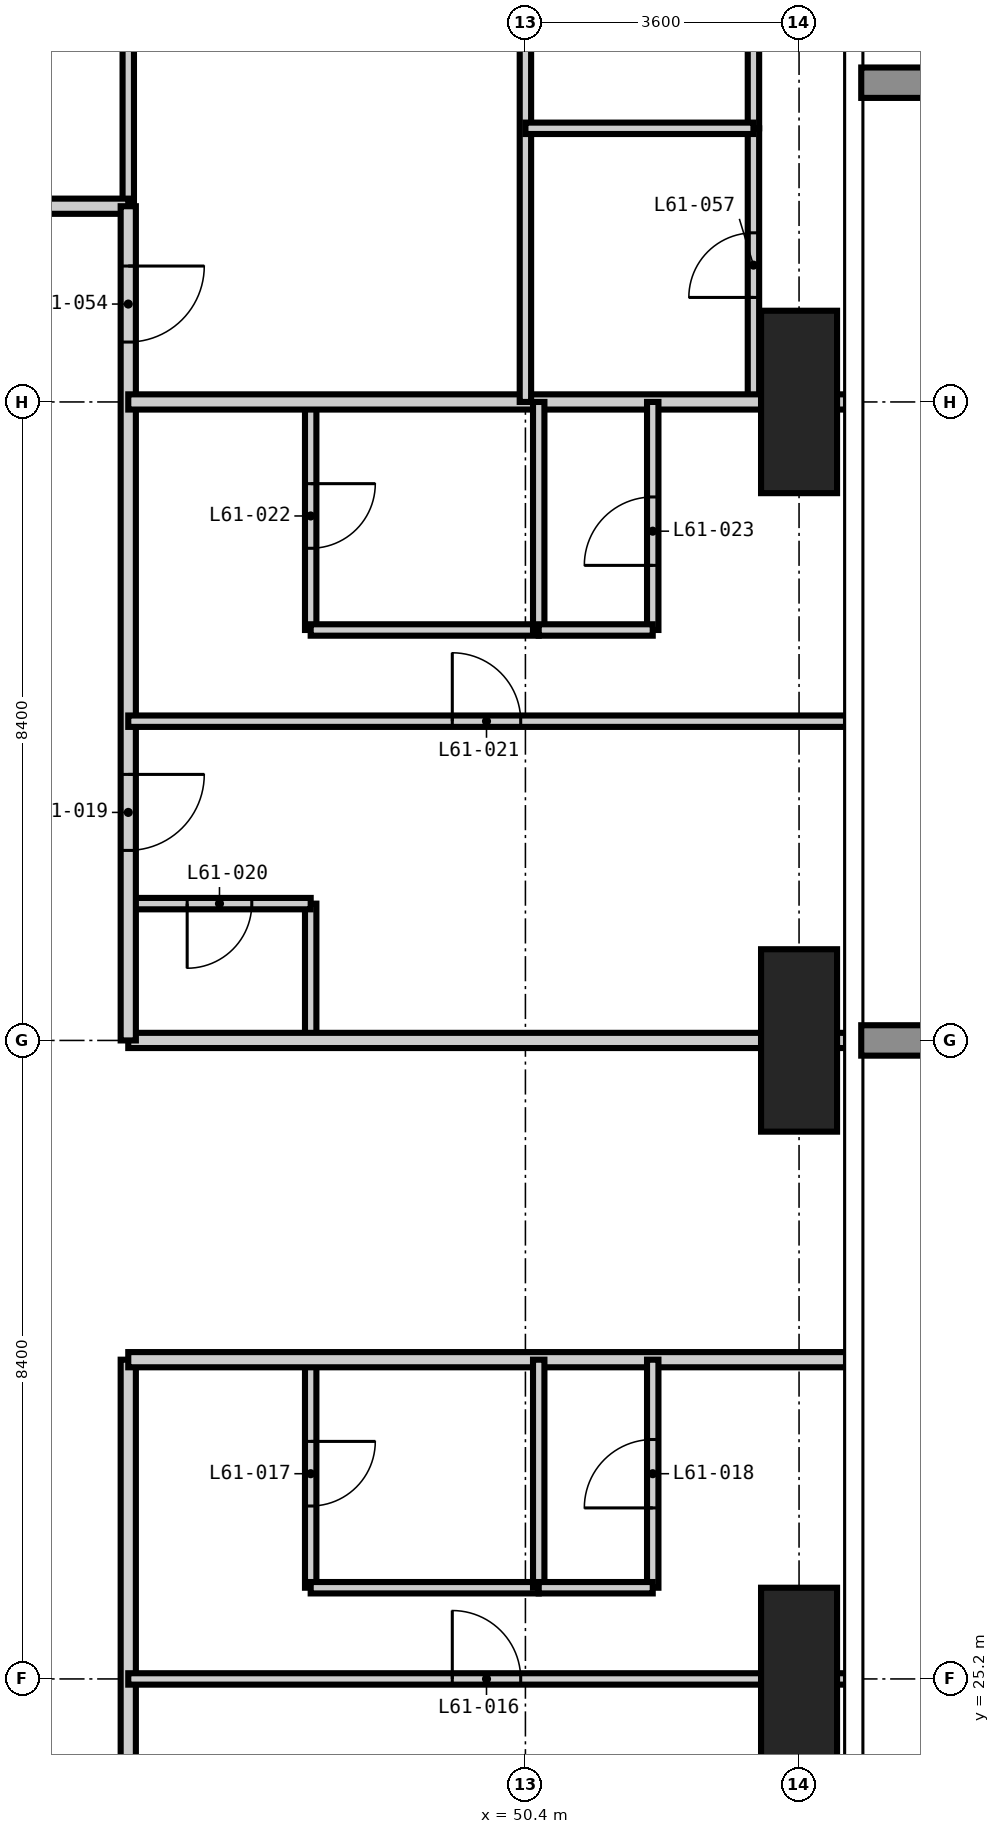
"""IFC4 building model, lengths in metres.
Left out: names, types, materials, properties, quantities, classifications, styles, units other than length and angle.
Written with IfcOpenShell. Run it as: python <this file> out.ifc"""

import sys

from ifc_helpers import new_model, si_unit, direction, frame, frame_2d, origin, origin_2d, place, context, subcontext, project, spatial, rectangle, extrude, element, fill, save


model = new_model("IFC4")
c1 = context("Model", 3, precision=1e-05, world=origin(), true_north=direction((0.0, 1.0)))
c2 = subcontext(c1, "Body", "Model", "MODEL_VIEW")
j1 = project(units=[si_unit("LENGTHUNIT", "METRE"), si_unit("PLANEANGLEUNIT", "RADIAN")], contexts=[c1])
p1 = place(None, origin())
s1 = spatial("IfcSite", under=j1, at=p1, CompositionType="ELEMENT")
p2 = place(p1, origin())
s2 = spatial("IfcBuilding", under=s1, at=p2, CompositionType="ELEMENT")
p3 = place(p2, frame((0.0, 0.0, 237.3)))
s3 = spatial("IfcBuildingStorey", under=s2, at=p3, CompositionType="ELEMENT", Elevation=237.3)
for number, where, z_axis, x_axis in (
    (1, (54.0, 25.2, -0.35), (0.0, 0.0, 1.0), (1.0, 0.0, 0.0)),
    (2, (54.0, 33.6, -0.35), (0.0, 0.0, 1.0), (1.0, 0.0, 0.0)),
    (3, (54.0, 42.0, -0.35), (0.0, 0.0, 1.0), (1.0, 0.0, 0.0)),
):
    element("IfcColumn", number, at=place(p3, frame(where, z_axis=z_axis, x_axis=x_axis)), inside=s3, PredefinedType="COLUMN", context=c2, shape_type="SweptSolid", body=[
        extrude(rectangle(XDim=1.0, YDim=2.4, at=origin_2d()), origin(), (0.0, 0.0, 1.0), 3.9),
    ])
p4 = place(p3, frame((45.175, 44.575, 0.0), z_axis=(0.0, 0.0, 1.0), x_axis=(0.0, 1.0, 0.0)))
e4 = element("IfcWall", 4, at=p4, inside=s3, PredefinedType="PARTITIONING", context=c2, shape_type="SweptSolid", body=[
    extrude(rectangle(XDim=3.0, YDim=0.15, at=frame_2d((1.5, 0.0))), origin(), (0.0, 0.0, 1.0), 3.55),
])
p5 = place(p3, frame((47.575, 26.4, 0.0), z_axis=(0.0, 0.0, 1.0), x_axis=(0.0, 1.0, 0.0)))
e5 = element("IfcWall", 5, at=p5, inside=s3, PredefinedType="PARTITIONING", context=c2, shape_type="SweptSolid", body=[
    extrude(rectangle(XDim=3.0, YDim=0.15, at=frame_2d((1.5, 0.0))), origin(), (0.0, 0.0, 1.0), 3.55),
])
p6 = place(p5, frame((1.075, 0.0, 0.0)))
e6 = element("IfcOpeningElement", 6, at=p6, cuts=e5, PredefinedType="OPENING", context=c2, shape_type="SweptSolid", body=[
    extrude(rectangle(XDim=0.85, YDim=2.1, at=frame_2d((0.425, 1.05))), frame((0.0, 0.085, 0.0), z_axis=(0.0, -1.0, 0.0), x_axis=(1.0, 0.0, 0.0)), (0.0, 0.0, 1.0), 0.17),
])
p7 = place(p3, frame((47.575, 33.6, 0.0), z_axis=(0.0, 0.0, 1.0), x_axis=(0.0, 1.0, 0.0)))
e7 = element("IfcWall", 7, at=p7, inside=s3, PredefinedType="PARTITIONING", context=c2, shape_type="SweptSolid", body=[
    extrude(rectangle(XDim=1.8, YDim=0.15, at=frame_2d((0.9, 0.0))), origin(), (0.0, 0.0, 1.0), 3.55),
])
p8 = place(p3, frame((47.575, 39.0, 0.0), z_axis=(0.0, 0.0, 1.0), x_axis=(0.0, 1.0, 0.0)))
e8 = element("IfcWall", 8, at=p8, inside=s3, PredefinedType="PARTITIONING", context=c2, shape_type="SweptSolid", body=[
    extrude(rectangle(XDim=3.0, YDim=0.15, at=frame_2d((1.5, 0.0))), origin(), (0.0, 0.0, 1.0), 3.55),
])
p9 = place(p8, frame((1.075, 0.0, 0.0)))
e9 = element("IfcOpeningElement", 9, at=p9, cuts=e8, PredefinedType="OPENING", context=c2, shape_type="SweptSolid", body=[
    extrude(rectangle(XDim=0.85, YDim=2.1, at=frame_2d((0.425, 1.05))), frame((0.0, 0.085, 0.0), z_axis=(0.0, -1.0, 0.0), x_axis=(1.0, 0.0, 0.0)), (0.0, 0.0, 1.0), 0.17),
])
p10 = place(p3, frame((53.4, 42.0, 0.0), z_axis=(0.0, 0.0, 1.0), x_axis=(0.0, 1.0, 0.0)))
e10 = element("IfcWall", 10, at=p10, inside=s3, PredefinedType="PARTITIONING", context=c2, shape_type="SweptSolid", body=[
    extrude(rectangle(XDim=3.6, YDim=0.15, at=frame_2d((1.8, 0.0))), origin(), (0.0, 0.0, 1.0), 3.55),
])
p11 = place(p10, frame((1.375, 0.0, 0.0)))
e11 = element("IfcOpeningElement", 11, at=p11, cuts=e10, PredefinedType="OPENING", context=c2, shape_type="SweptSolid", body=[
    extrude(rectangle(XDim=0.85, YDim=2.1, at=frame_2d((0.425, 1.05))), frame((0.0, 0.085, 0.0), z_axis=(0.0, -1.0, 0.0), x_axis=(1.0, 0.0, 0.0)), (0.0, 0.0, 1.0), 0.17),
])
p12 = place(p3, frame((47.575, 26.4, 0.0), z_axis=(0.0, 0.0, 1.0), x_axis=(1.0, 0.0, 0.0)))
e12 = element("IfcWall", 12, at=p12, inside=s3, PredefinedType="PARTITIONING", context=c2, shape_type="SweptSolid", body=[
    extrude(rectangle(XDim=3.0, YDim=0.15, at=frame_2d((1.5, 0.0))), origin(), (0.0, 0.0, 1.0), 3.55),
])
p13 = place(p3, frame((45.175, 35.4, 0.0), z_axis=(0.0, 0.0, 1.0), x_axis=(1.0, 0.0, 0.0)))
e13 = element("IfcWall", 13, at=p13, inside=s3, PredefinedType="PARTITIONING", context=c2, shape_type="SweptSolid", body=[
    extrude(rectangle(XDim=2.4, YDim=0.15, at=frame_2d((1.2, 0.0))), origin(), (0.0, 0.0, 1.0), 3.55),
])
p14 = place(p13, frame((0.775, 0.0, 0.0)))
e14 = element("IfcOpeningElement", 14, at=p14, cuts=e13, PredefinedType="OPENING", context=c2, shape_type="SweptSolid", body=[
    extrude(rectangle(XDim=0.85, YDim=2.1, at=frame_2d((0.425, 1.05))), frame((0.0, 0.085, 0.0), z_axis=(0.0, -1.0, 0.0), x_axis=(1.0, 0.0, 0.0)), (0.0, 0.0, 1.0), 0.17),
])
p15 = place(p3, frame((47.575, 39.0, 0.0), z_axis=(0.0, 0.0, 1.0), x_axis=(1.0, 0.0, 0.0)))
e15 = element("IfcWall", 15, at=p15, inside=s3, PredefinedType="PARTITIONING", context=c2, shape_type="SweptSolid", body=[
    extrude(rectangle(XDim=3.0, YDim=0.15, at=frame_2d((1.5, 0.0))), origin(), (0.0, 0.0, 1.0), 3.55),
])
p16 = place(p3, frame((45.175, 33.6, 0.0), z_axis=(0.0, 0.0, 1.0), x_axis=(1.0, 0.0, 0.0)))
e16 = element("IfcWall", 16, at=p16, inside=s3, PredefinedType="PARTITIONING", context=c2, shape_type="SweptSolid", body=[
    extrude(rectangle(XDim=9.443, YDim=0.2, at=frame_2d((4.721, 0.0))), origin(), (0.0, 0.0, 1.0), 3.55),
])
p17 = place(p3, frame((22.325, 44.575, 0.0), z_axis=(0.0, 0.0, 1.0), x_axis=(1.0, 0.0, 0.0)))
e17 = element("IfcWall", 17, at=p17, inside=s3, PredefinedType="PARTITIONING", context=c2, shape_type="SweptSolid", body=[
    extrude(rectangle(XDim=22.85, YDim=0.2, at=frame_2d((11.425, 0.0))), origin(), (0.0, 0.0, 1.0), 3.55),
])
p18 = place(p17, frame((6.575, 0.0, 0.0)))
e18 = element("IfcOpeningElement", 18, at=p18, cuts=e17, PredefinedType="OPENING", context=c2, shape_type="SweptSolid", body=[
    extrude(rectangle(XDim=1.0, YDim=2.2, at=frame_2d((0.5, 1.1))), frame((0.0, 0.11, 0.0), z_axis=(0.0, -1.0, 0.0), x_axis=(1.0, 0.0, 0.0)), (0.0, 0.0, 1.0), 0.22),
])
p19 = place(p17, frame((14.975, 0.0, 0.0)))
e19 = element("IfcOpeningElement", 19, at=p19, cuts=e17, PredefinedType="OPENING", context=c2, shape_type="SweptSolid", body=[
    extrude(rectangle(XDim=1.0, YDim=2.2, at=frame_2d((0.5, 1.1))), frame((0.0, 0.11, 0.0), z_axis=(0.0, -1.0, 0.0), x_axis=(1.0, 0.0, 0.0)), (0.0, 0.0, 1.0), 0.22),
])
p20 = place(p3, frame((45.175, 29.4, 0.0), z_axis=(0.0, 0.0, 1.0), x_axis=(0.0, -1.0, 0.0)))
e20 = element("IfcWall", 20, at=p20, inside=s3, PredefinedType="PARTITIONING", context=c2, shape_type="SweptSolid", body=[
    extrude(rectangle(XDim=15.475, YDim=0.2, at=frame_2d((7.737, 0.0))), origin(), (0.0, 0.0, 1.0), 3.55),
])
p21 = place(p20, frame((9.1, 0.0, 0.0)))
e21 = element("IfcOpeningElement", 21, at=p21, cuts=e20, PredefinedType="OPENING", context=c2, shape_type="SweptSolid", body=[
    extrude(rectangle(XDim=1.0, YDim=2.2, at=frame_2d((0.5, 1.1))), frame((0.0, 0.11, 0.0), z_axis=(0.0, -1.0, 0.0), x_axis=(1.0, 0.0, 0.0)), (0.0, 0.0, 1.0), 0.22),
])
p22 = place(p20, frame((13.537, 0.0, 0.0)))
e22 = element("IfcOpeningElement", 22, at=p22, cuts=e20, PredefinedType="OPENING", context=c2, shape_type="SweptSolid", body=[
    extrude(rectangle(XDim=1.0, YDim=2.2, at=frame_2d((0.5, 1.1))), frame((0.0, 0.11, 0.0), z_axis=(0.0, -1.0, 0.0), x_axis=(1.0, 0.0, 0.0)), (0.0, 0.0, 1.0), 0.22),
])
p23 = place(p3, frame((45.175, 44.575, 0.0), z_axis=(0.0, 0.0, 1.0), x_axis=(0.0, -1.0, 0.0)))
e23 = element("IfcWall", 23, at=p23, inside=s3, PredefinedType="PARTITIONING", context=c2, shape_type="SweptSolid", body=[
    extrude(rectangle(XDim=10.975, YDim=0.2, at=frame_2d((5.487, 0.0))), origin(), (0.0, 0.0, 1.0), 3.55),
])
p24 = place(p23, frame((7.475, 0.0, 0.0)))
e24 = element("IfcOpeningElement", 24, at=p24, cuts=e23, PredefinedType="OPENING", context=c2, shape_type="SweptSolid", body=[
    extrude(rectangle(XDim=1.0, YDim=2.2, at=frame_2d((0.5, 1.1))), frame((0.0, 0.11, 0.0), z_axis=(0.0, -1.0, 0.0), x_axis=(1.0, 0.0, 0.0)), (0.0, 0.0, 1.0), 0.22),
])
p25 = place(p23, frame((0.787, 0.0, 0.0)))
e25 = element("IfcOpeningElement", 25, at=p25, cuts=e23, PredefinedType="OPENING", context=c2, shape_type="SweptSolid", body=[
    extrude(rectangle(XDim=1.0, YDim=2.2, at=frame_2d((0.5, 1.1))), frame((0.0, 0.11, 0.0), z_axis=(0.0, -1.0, 0.0), x_axis=(1.0, 0.0, 0.0)), (0.0, 0.0, 1.0), 0.22),
])
for number, where, z_axis, x_axis in (
    (26, (54.618, 29.4, 0.0), (0.0, 0.0, 1.0), (-1.0, 0.0, 0.0)),
    (27, (45.175, 42.0, 0.0), (0.0, 0.0, 1.0), (1.0, 0.0, 0.0)),
):
    element("IfcWall", number, at=place(p3, frame(where, z_axis=z_axis, x_axis=x_axis)), inside=s3, PredefinedType="PARTITIONING", context=c2, shape_type="SweptSolid", body=[
        extrude(rectangle(XDim=9.443, YDim=0.2, at=frame_2d((4.721, 0.0))), origin(), (0.0, 0.0, 1.0), 3.55),
    ])
p26 = place(p3, frame((50.4, 42.0, 0.0), z_axis=(0.0, 0.0, 1.0), x_axis=(0.0, 1.0, 0.0)))
e28 = element("IfcWall", 28, at=p26, inside=s3, PredefinedType="PARTITIONING", context=c2, shape_type="SweptSolid", body=[
    extrude(rectangle(XDim=12.618, YDim=0.15, at=frame_2d((6.309, 0.0))), origin(), (0.0, 0.0, 1.0), 3.55),
])
p27 = place(p26, frame((8.85, 0.0, 0.0)))
e29 = element("IfcOpeningElement", 29, at=p27, cuts=e28, PredefinedType="OPENING", context=c2, shape_type="SweptSolid", body=[
    extrude(rectangle(XDim=0.9, YDim=2.1, at=frame_2d((0.45, 1.05))), frame((0.0, 0.085, 0.0), z_axis=(0.0, -1.0, 0.0), x_axis=(1.0, 0.0, 0.0)), (0.0, 0.0, 1.0), 0.17),
])
for number, where, z_axis, x_axis in (
    (30, (50.575, 26.4, 0.0), (0.0, 0.0, 1.0), (0.0, 1.0, 0.0)),
    (31, (50.575, 39.0, 0.0), (0.0, 0.0, 1.0), (0.0, 1.0, 0.0)),
):
    element("IfcWall", number, at=place(p3, frame(where, z_axis=z_axis, x_axis=x_axis)), inside=s3, PredefinedType="PARTITIONING", context=c2, shape_type="SweptSolid", body=[
        extrude(rectangle(XDim=3.0, YDim=0.15, at=frame_2d((1.5, 0.0))), origin(), (0.0, 0.0, 1.0), 3.55),
    ])
p28 = place(p3, frame((52.075, 26.4, 0.0), z_axis=(0.0, 0.0, 1.0), x_axis=(0.0, 1.0, 0.0)))
e32 = element("IfcWall", 32, at=p28, inside=s3, PredefinedType="PARTITIONING", context=c2, shape_type="SweptSolid", body=[
    extrude(rectangle(XDim=3.0, YDim=0.15, at=frame_2d((1.5, 0.0))), origin(), (0.0, 0.0, 1.0), 3.55),
])
p29 = place(p28, frame((1.05, 0.0, 0.0)))
e33 = element("IfcOpeningElement", 33, at=p29, cuts=e32, PredefinedType="OPENING", context=c2, shape_type="SweptSolid", body=[
    extrude(rectangle(XDim=0.9, YDim=2.1, at=frame_2d((0.45, 1.05))), frame((0.0, 0.085, 0.0), z_axis=(0.0, -1.0, 0.0), x_axis=(1.0, 0.0, 0.0)), (0.0, 0.0, 1.0), 0.17),
])
p30 = place(p3, frame((52.075, 39.0, 0.0), z_axis=(0.0, 0.0, 1.0), x_axis=(0.0, 1.0, 0.0)))
e34 = element("IfcWall", 34, at=p30, inside=s3, PredefinedType="PARTITIONING", context=c2, shape_type="SweptSolid", body=[
    extrude(rectangle(XDim=3.0, YDim=0.15, at=frame_2d((1.5, 0.0))), origin(), (0.0, 0.0, 1.0), 3.55),
])
p31 = place(p30, frame((0.85, 0.0, 0.0)))
e35 = element("IfcOpeningElement", 35, at=p31, cuts=e34, PredefinedType="OPENING", context=c2, shape_type="SweptSolid", body=[
    extrude(rectangle(XDim=0.9, YDim=2.1, at=frame_2d((0.45, 1.05))), frame((0.0, 0.085, 0.0), z_axis=(0.0, -1.0, 0.0), x_axis=(1.0, 0.0, 0.0)), (0.0, 0.0, 1.0), 0.17),
])
p32 = place(p3, frame((53.4, 45.6, 0.0), z_axis=(0.0, 0.0, 1.0), x_axis=(0.0, 1.0, 0.0)))
e36 = element("IfcWall", 36, at=p32, inside=s3, PredefinedType="PARTITIONING", context=c2, shape_type="SweptSolid", body=[
    extrude(rectangle(XDim=2.4, YDim=0.15, at=frame_2d((1.2, 0.0))), origin(), (0.0, 0.0, 1.0), 3.55),
])
p33 = place(p3, frame((45.175, 25.2, 0.0), z_axis=(0.0, 0.0, 1.0), x_axis=(1.0, 0.0, 0.0)))
e37 = element("IfcWall", 37, at=p33, inside=s3, PredefinedType="PARTITIONING", context=c2, shape_type="SweptSolid", body=[
    extrude(rectangle(XDim=9.443, YDim=0.15, at=frame_2d((4.721, 0.0))), origin(), (0.0, 0.0, 1.0), 3.55),
])
p34 = place(p33, frame((4.263, 0.0, 0.0)))
e38 = element("IfcOpeningElement", 38, at=p34, cuts=e37, PredefinedType="OPENING", context=c2, shape_type="SweptSolid", body=[
    extrude(rectangle(XDim=0.9, YDim=2.1, at=frame_2d((0.45, 1.05))), frame((0.0, 0.085, 0.0), z_axis=(0.0, -1.0, 0.0), x_axis=(1.0, 0.0, 0.0)), (0.0, 0.0, 1.0), 0.17),
])
p35 = place(p3, frame((50.575, 26.4, 0.0), z_axis=(0.0, 0.0, 1.0), x_axis=(1.0, 0.0, 0.0)))
e39 = element("IfcWall", 39, at=p35, inside=s3, PredefinedType="PARTITIONING", context=c2, shape_type="SweptSolid", body=[
    extrude(rectangle(XDim=1.5, YDim=0.15, at=frame_2d((0.75, 0.0))), origin(), (0.0, 0.0, 1.0), 3.55),
])
p36 = place(p3, frame((45.175, 37.8, 0.0), z_axis=(0.0, 0.0, 1.0), x_axis=(1.0, 0.0, 0.0)))
e40 = element("IfcWall", 40, at=p36, inside=s3, PredefinedType="PARTITIONING", context=c2, shape_type="SweptSolid", body=[
    extrude(rectangle(XDim=9.443, YDim=0.15, at=frame_2d((4.721, 0.0))), origin(), (0.0, 0.0, 1.0), 3.55),
])
p37 = place(p36, frame((4.263, 0.0, 0.0)))
e41 = element("IfcOpeningElement", 41, at=p37, cuts=e40, PredefinedType="OPENING", context=c2, shape_type="SweptSolid", body=[
    extrude(rectangle(XDim=0.9, YDim=2.1, at=frame_2d((0.45, 1.05))), frame((0.0, 0.085, 0.0), z_axis=(0.0, -1.0, 0.0), x_axis=(1.0, 0.0, 0.0)), (0.0, 0.0, 1.0), 0.17),
])
p38 = place(p3, frame((50.575, 39.0, 0.0), z_axis=(0.0, 0.0, 1.0), x_axis=(1.0, 0.0, 0.0)))
e42 = element("IfcWall", 42, at=p38, inside=s3, PredefinedType="PARTITIONING", context=c2, shape_type="SweptSolid", body=[
    extrude(rectangle(XDim=1.5, YDim=0.15, at=frame_2d((0.75, 0.0))), origin(), (0.0, 0.0, 1.0), 3.55),
])
p39 = place(p3, frame((50.4, 45.6, 0.0), z_axis=(0.0, 0.0, 1.0), x_axis=(1.0, 0.0, 0.0)))
e43 = element("IfcWall", 43, at=p39, inside=s3, PredefinedType="PARTITIONING", context=c2, shape_type="SweptSolid", body=[
    extrude(rectangle(XDim=3.0, YDim=0.15, at=frame_2d((1.5, 0.0))), origin(), (0.0, 0.0, 1.0), 3.55),
])
p40 = place(p34, origin())
e44 = element("IfcDoor", 44, at=p40, inside=s3, OperationType="SINGLE_SWING_LEFT", PredefinedType="DOOR", context=c2, shape_type="SweptSolid", body=[
    extrude(rectangle(XDim=0.9, YDim=2.1, at=frame_2d((0.45, 1.05))), frame((0.0, 0.025, 0.0), z_axis=(0.0, -1.0, 0.0), x_axis=(1.0, 0.0, 0.0)), (0.0, 0.0, 1.0), 0.05),
])
fill(e38, e44)
p41 = place(p6, frame((0.85, 0.0, 0.0), z_axis=(0.0, 0.0, 1.0), x_axis=(-1.0, 0.0, 0.0)))
e45 = element("IfcDoor", 45, at=p41, inside=s3, OperationType="SINGLE_SWING_LEFT", PredefinedType="DOOR", context=c2, shape_type="SweptSolid", body=[
    extrude(rectangle(XDim=0.85, YDim=2.1, at=frame_2d((0.425, 1.05))), frame((0.0, 0.025, 0.0), z_axis=(0.0, -1.0, 0.0), x_axis=(1.0, 0.0, 0.0)), (0.0, 0.0, 1.0), 0.05),
])
fill(e6, e45)
p42 = place(p29, origin())
e46 = element("IfcDoor", 46, at=p42, inside=s3, OperationType="SINGLE_SWING_LEFT", PredefinedType="DOOR", context=c2, shape_type="SweptSolid", body=[
    extrude(rectangle(XDim=0.9, YDim=2.1, at=frame_2d((0.45, 1.05))), frame((0.0, 0.025, 0.0), z_axis=(0.0, -1.0, 0.0), x_axis=(1.0, 0.0, 0.0)), (0.0, 0.0, 1.0), 0.05),
])
fill(e33, e46)
p43 = place(p24, origin())
e47 = element("IfcDoor", 47, at=p43, inside=s3, OperationType="SINGLE_SWING_LEFT", PredefinedType="DOOR", context=c2, shape_type="SweptSolid", body=[
    extrude(rectangle(XDim=1.0, YDim=2.2, at=frame_2d((0.5, 1.1))), frame((0.0, 0.025, 0.0), z_axis=(0.0, -1.0, 0.0), x_axis=(1.0, 0.0, 0.0)), (0.0, 0.0, 1.0), 0.05),
])
fill(e24, e47)
p44 = place(p14, frame((0.85, 0.0, 0.0), z_axis=(0.0, 0.0, 1.0), x_axis=(-1.0, 0.0, 0.0)))
e48 = element("IfcDoor", 48, at=p44, inside=s3, OperationType="SINGLE_SWING_RIGHT", PredefinedType="DOOR", context=c2, shape_type="SweptSolid", body=[
    extrude(rectangle(XDim=0.85, YDim=2.1, at=frame_2d((0.425, 1.05))), frame((0.0, 0.025, 0.0), z_axis=(0.0, -1.0, 0.0), x_axis=(1.0, 0.0, 0.0)), (0.0, 0.0, 1.0), 0.05),
])
fill(e14, e48)
p45 = place(p37, origin())
e49 = element("IfcDoor", 49, at=p45, inside=s3, OperationType="SINGLE_SWING_LEFT", PredefinedType="DOOR", context=c2, shape_type="SweptSolid", body=[
    extrude(rectangle(XDim=0.9, YDim=2.1, at=frame_2d((0.45, 1.05))), frame((0.0, 0.025, 0.0), z_axis=(0.0, -1.0, 0.0), x_axis=(1.0, 0.0, 0.0)), (0.0, 0.0, 1.0), 0.05),
])
fill(e41, e49)
p46 = place(p9, frame((0.85, 0.0, 0.0), z_axis=(0.0, 0.0, 1.0), x_axis=(-1.0, 0.0, 0.0)))
e50 = element("IfcDoor", 50, at=p46, inside=s3, OperationType="SINGLE_SWING_LEFT", PredefinedType="DOOR", context=c2, shape_type="SweptSolid", body=[
    extrude(rectangle(XDim=0.85, YDim=2.1, at=frame_2d((0.425, 1.05))), frame((0.0, 0.025, 0.0), z_axis=(0.0, -1.0, 0.0), x_axis=(1.0, 0.0, 0.0)), (0.0, 0.0, 1.0), 0.05),
])
fill(e9, e50)
p47 = place(p31, origin())
e51 = element("IfcDoor", 51, at=p47, inside=s3, OperationType="SINGLE_SWING_LEFT", PredefinedType="DOOR", context=c2, shape_type="SweptSolid", body=[
    extrude(rectangle(XDim=0.9, YDim=2.1, at=frame_2d((0.45, 1.05))), frame((0.0, 0.025, 0.0), z_axis=(0.0, -1.0, 0.0), x_axis=(1.0, 0.0, 0.0)), (0.0, 0.0, 1.0), 0.05),
])
fill(e35, e51)
p48 = place(p25, origin())
e52 = element("IfcDoor", 52, at=p48, inside=s3, OperationType="SINGLE_SWING_LEFT", PredefinedType="DOOR", context=c2, shape_type="SweptSolid", body=[
    extrude(rectangle(XDim=1.0, YDim=2.2, at=frame_2d((0.5, 1.1))), frame((0.0, 0.025, 0.0), z_axis=(0.0, -1.0, 0.0), x_axis=(1.0, 0.0, 0.0)), (0.0, 0.0, 1.0), 0.05),
])
fill(e25, e52)
p49 = place(p11, origin())
e53 = element("IfcDoor", 53, at=p49, inside=s3, OperationType="SINGLE_SWING_LEFT", PredefinedType="DOOR", context=c2, shape_type="SweptSolid", body=[
    extrude(rectangle(XDim=0.85, YDim=2.1, at=frame_2d((0.425, 1.05))), frame((0.0, 0.025, 0.0), z_axis=(0.0, -1.0, 0.0), x_axis=(1.0, 0.0, 0.0)), (0.0, 0.0, 1.0), 0.05),
])
fill(e11, e53)
save(model, sys.argv[1])
